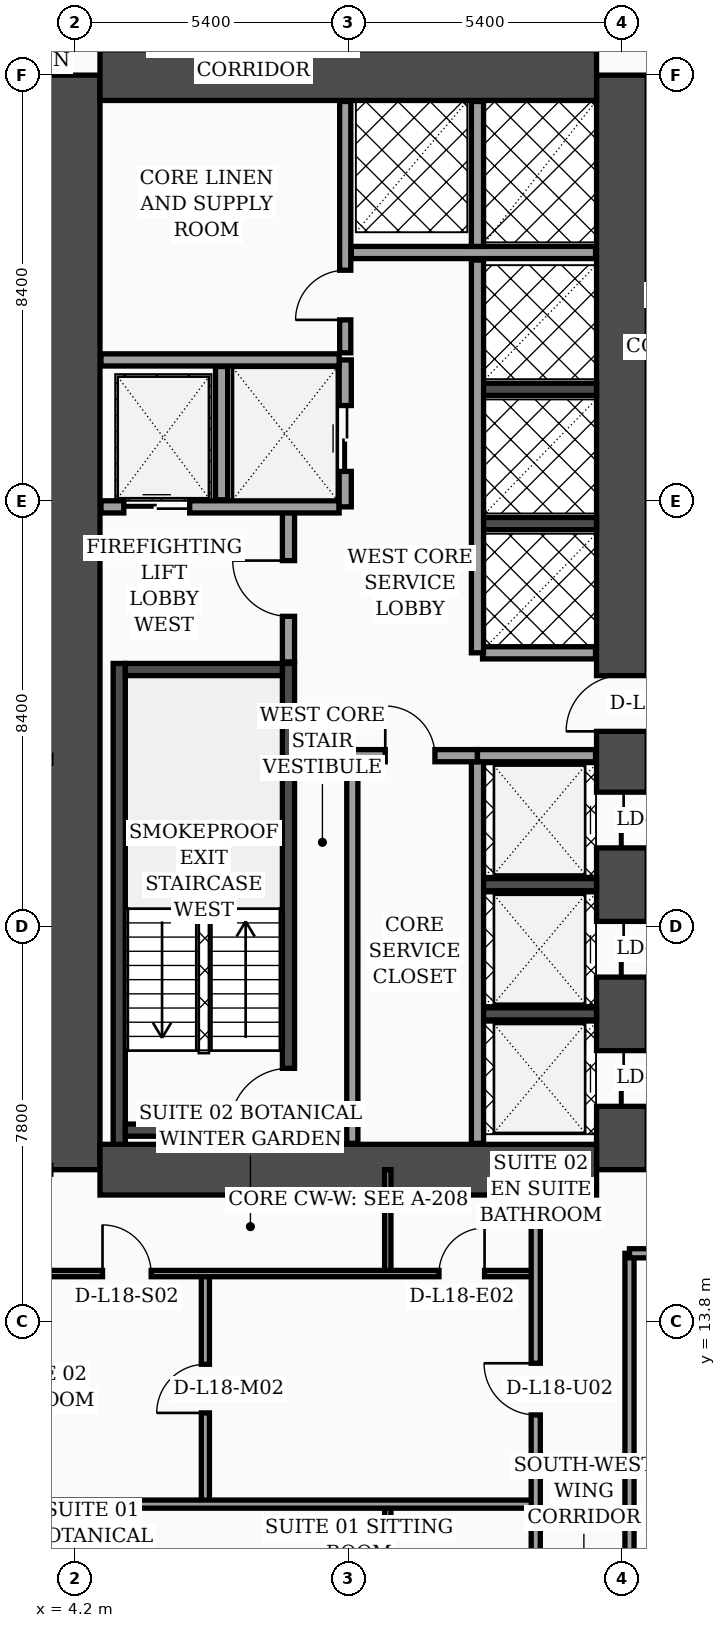
"""IFC4 building model, lengths in metres.
Left out: names, types, materials, properties, quantities, classifications, styles, units other than length and angle.
Written with IfcOpenShell. Run it as: python <this file> out.ifc"""

import sys

from ifc_helpers import new_model, si_unit, direction, frame, frame_2d, origin, place, context, subcontext, project, spatial, rectangle, extrude, element, fill, save


model = new_model("IFC4")
c1 = context("Model", 3, precision=1e-05, world=origin(), true_north=direction((0.0, 1.0)))
c2 = subcontext(c1, "Body", "Model", "MODEL_VIEW")
j1 = project(units=[si_unit("LENGTHUNIT", "METRE"), si_unit("PLANEANGLEUNIT", "RADIAN")], contexts=[c1])
p1 = place(None, origin())
s1 = spatial("IfcSite", under=j1, at=p1, CompositionType="ELEMENT")
p2 = place(p1, origin())
s2 = spatial("IfcBuilding", under=s1, at=p2, CompositionType="ELEMENT")
p3 = place(p2, frame((0.0, 0.0, 77.4)))
s3 = spatial("IfcBuildingStorey", under=s2, at=p3, CompositionType="ELEMENT", Elevation=77.4)
p4 = place(p3, frame((4.2, 16.8, 0.0), z_axis=(0.0, 0.0, 1.0), x_axis=(0.0, 1.0, 0.0)))
e1 = element("IfcWall", 1, at=p4, inside=s3, PredefinedType="SHEAR", context=c2, shape_type="SweptSolid", body=[
    extrude(rectangle(XDim=21.6, YDim=1.0, at=frame_2d((10.8, 0.0))), origin(), (0.0, 0.0, 1.0), 3.56),
])
p5 = place(p3, frame((15.0, 16.8, 0.0), z_axis=(0.0, 0.0, 1.0), x_axis=(0.0, 1.0, 0.0)))
e2 = element("IfcWall", 2, at=p5, inside=s3, PredefinedType="SHEAR", context=c2, shape_type="SweptSolid", body=[
    extrude(rectangle(XDim=21.6, YDim=1.0, at=frame_2d((10.8, 0.0))), origin(), (0.0, 0.0, 1.0), 3.56),
])
p6 = place(p5, frame((8.65, 0.0, 0.0)))
e3 = element("IfcOpeningElement", 3, at=p6, cuts=e2, PredefinedType="OPENING", context=c2, shape_type="SweptSolid", body=[
    extrude(rectangle(XDim=1.1, YDim=2.2, at=frame_2d((0.55, 1.1))), frame((0.0, 0.51, 0.0), z_axis=(0.0, -1.0, 0.0), x_axis=(1.0, 0.0, 0.0)), (0.0, 0.0, 1.0), 1.02),
])
p7 = place(p5, frame((1.25, 0.0, 0.0)))
e4 = element("IfcOpeningElement", 4, at=p7, cuts=e2, PredefinedType="OPENING", context=c2, shape_type="SweptSolid", body=[
    extrude(rectangle(XDim=1.1, YDim=2.2, at=frame_2d((0.55, 1.1))), frame((0.0, 0.51, 0.0), z_axis=(0.0, -1.0, 0.0), x_axis=(1.0, 0.0, 0.0)), (0.0, 0.0, 1.0), 1.02),
])
p8 = place(p5, frame((3.8, 0.0, 0.0)))
e5 = element("IfcOpeningElement", 5, at=p8, cuts=e2, PredefinedType="OPENING", context=c2, shape_type="SweptSolid", body=[
    extrude(rectangle(XDim=1.1, YDim=2.2, at=frame_2d((0.55, 1.1))), frame((0.0, 0.51, 0.0), z_axis=(0.0, -1.0, 0.0), x_axis=(1.0, 0.0, 0.0)), (0.0, 0.0, 1.0), 1.02),
])
p9 = place(p5, frame((6.35, 0.0, 0.0)))
e6 = element("IfcOpeningElement", 6, at=p9, cuts=e2, PredefinedType="OPENING", context=c2, shape_type="SweptSolid", body=[
    extrude(rectangle(XDim=1.1, YDim=2.2, at=frame_2d((0.55, 1.1))), frame((0.0, 0.51, 0.0), z_axis=(0.0, -1.0, 0.0), x_axis=(1.0, 0.0, 0.0)), (0.0, 0.0, 1.0), 1.02),
])
for number, where, z_axis, x_axis in (
    (7, (4.7, 38.4, 0.0), (0.0, 0.0, 1.0), (1.0, 0.0, 0.0)),
    (8, (4.7, 16.8, 0.0), (0.0, 0.0, 1.0), (1.0, 0.0, 0.0)),
):
    element("IfcWall", number, at=place(p3, frame(where, z_axis=z_axis, x_axis=x_axis)), inside=s3, PredefinedType="SHEAR", context=c2, shape_type="SweptSolid", body=[
        extrude(rectangle(XDim=9.8, YDim=1.0, at=frame_2d((4.9, 0.0))), origin(), (0.0, 0.0, 1.0), 3.56),
    ])
p10 = place(p3, frame((5.08, 17.3, 0.0), z_axis=(0.0, 0.0, 1.0), x_axis=(0.0, 1.0, 0.0)))
e9 = element("IfcWall", 9, at=p10, inside=s3, PredefinedType="SOLIDWALL", context=c2, shape_type="SweptSolid", body=[
    extrude(rectangle(XDim=9.49, YDim=0.24, at=frame_2d((4.745, 0.0))), origin(), (0.0, 0.0, 1.0), 3.56),
])
p11 = place(p3, frame((8.42, 17.3, 0.0), z_axis=(0.0, 0.0, 1.0), x_axis=(0.0, 1.0, 0.0)))
e10 = element("IfcWall", 10, at=p11, inside=s3, PredefinedType="SOLIDWALL", context=c2, shape_type="SweptSolid", body=[
    extrude(rectangle(XDim=9.49, YDim=0.24, at=frame_2d((4.745, 0.0))), origin(), (0.0, 0.0, 1.0), 3.56),
])
p12 = place(p11, frame((0.35, 0.0, 0.0)))
e11 = element("IfcOpeningElement", 11, at=p12, cuts=e10, PredefinedType="OPENING", context=c2, shape_type="SweptSolid", body=[
    extrude(rectangle(XDim=1.15, YDim=2.2, at=frame_2d((0.575, 1.1))), frame((0.0, 0.13, 0.0), z_axis=(0.0, -1.0, 0.0), x_axis=(1.0, 0.0, 0.0)), (0.0, 0.0, 1.0), 0.26),
])
for number, where, z_axis, x_axis in (
    (12, (5.2, 17.58, 0.0), (0.0, 0.0, 1.0), (1.0, 0.0, 0.0)),
    (13, (5.2, 26.67, 0.0), (0.0, 0.0, 1.0), (1.0, 0.0, 0.0)),
):
    element("IfcWall", number, at=place(p3, frame(where, z_axis=z_axis, x_axis=x_axis)), inside=s3, PredefinedType="SOLIDWALL", context=c2, shape_type="SweptSolid", body=[
        extrude(rectangle(XDim=3.1, YDim=0.24, at=frame_2d((1.55, 0.0))), origin(), (0.0, 0.0, 1.0), 3.56),
    ])
for number, where, z_axis, x_axis in (
    (14, (12.18, 19.875, 0.0), (0.0, 0.0, 1.0), (1.0, 0.0, 0.0)),
    (15, (12.18, 22.425, 0.0), (0.0, 0.0, 1.0), (1.0, 0.0, 0.0)),
    (16, (12.18, 29.55, 0.0), (0.0, 0.0, 1.0), (1.0, 0.0, 0.0)),
    (17, (12.18, 32.2, 0.0), (0.0, 0.0, 1.0), (1.0, 0.0, 0.0)),
):
    element("IfcWall", number, at=place(p3, frame(where, z_axis=z_axis, x_axis=x_axis)), inside=s3, PredefinedType="SOLIDWALL", context=c2, shape_type="SweptSolid", body=[
        extrude(rectangle(XDim=2.32, YDim=0.24, at=frame_2d((1.16, 0.0))), origin(), (0.0, 0.0, 1.0), 3.56),
    ])
p13 = place(p3, frame((8.42, 26.82, 0.0), z_axis=(0.0, 0.0, 1.0), x_axis=(0.0, 1.0, 0.0)))
e18 = element("IfcWall", 18, at=p13, inside=s3, PredefinedType="SOLIDWALL", context=c2, shape_type="SweptSolid", body=[
    extrude(rectangle(XDim=3.0, YDim=0.24, at=frame_2d((1.5, 0.0))), origin(), (0.0, 0.0, 1.0), 3.56),
])
p14 = place(p13, frame((0.9, 0.0, 0.0)))
e19 = element("IfcOpeningElement", 19, at=p14, cuts=e18, PredefinedType="OPENING", context=c2, shape_type="SweptSolid", body=[
    extrude(rectangle(XDim=1.1, YDim=2.2, at=frame_2d((0.55, 1.1))), frame((0.0, 0.13, 0.0), z_axis=(0.0, -1.0, 0.0), x_axis=(1.0, 0.0, 0.0)), (0.0, 0.0, 1.0), 0.26),
])
p15 = place(p3, frame((4.72, 29.88, 0.0), z_axis=(0.0, 0.0, 1.0), x_axis=(1.0, 0.0, 0.0)))
e20 = element("IfcWall", 20, at=p15, inside=s3, PredefinedType="SOLIDWALL", context=c2, shape_type="SweptSolid", body=[
    extrude(rectangle(XDim=4.7, YDim=0.24, at=frame_2d((2.35, 0.0))), origin(), (0.0, 0.0, 1.0), 3.56),
])
p16 = place(p15, frame((0.45, 0.0, 0.0)))
e21 = element("IfcOpeningElement", 21, at=p16, cuts=e20, PredefinedType="OPENING", context=c2, shape_type="SweptSolid", body=[
    extrude(rectangle(XDim=1.3, YDim=2.35, at=frame_2d((0.65, 1.175))), frame((0.0, 0.13, 0.0), z_axis=(0.0, -1.0, 0.0), x_axis=(1.0, 0.0, 0.0)), (0.0, 0.0, 1.0), 0.26),
])
p17 = place(p3, frame((7.1, 30.02, 0.0), z_axis=(0.0, 0.0, 1.0), x_axis=(0.0, 1.0, 0.0)))
e22 = element("IfcWall", 22, at=p17, inside=s3, PredefinedType="SOLIDWALL", context=c2, shape_type="SweptSolid", body=[
    extrude(rectangle(XDim=2.63, YDim=0.24, at=frame_2d((1.315, 0.0))), origin(), (0.0, 0.0, 1.0), 3.56),
])
p18 = place(p3, frame((9.54, 29.88, 0.0), z_axis=(0.0, 0.0, 1.0), x_axis=(0.0, 1.0, 0.0)))
e23 = element("IfcWall", 23, at=p18, inside=s3, PredefinedType="SOLIDWALL", context=c2, shape_type="SweptSolid", body=[
    extrude(rectangle(XDim=2.9, YDim=0.24, at=frame_2d((1.45, 0.0))), origin(), (0.0, 0.0, 1.0), 3.56),
])
p19 = place(p18, frame((0.7, 0.0, 0.0)))
e24 = element("IfcOpeningElement", 24, at=p19, cuts=e23, PredefinedType="OPENING", context=c2, shape_type="SweptSolid", body=[
    extrude(rectangle(XDim=1.3, YDim=2.35, at=frame_2d((0.65, 1.175))), frame((0.0, 0.13, 0.0), z_axis=(0.0, -1.0, 0.0), x_axis=(1.0, 0.0, 0.0)), (0.0, 0.0, 1.0), 0.26),
])
p20 = place(p3, frame((4.72, 32.78, 0.0), z_axis=(0.0, 0.0, 1.0), x_axis=(1.0, 0.0, 0.0)))
e25 = element("IfcWall", 25, at=p20, inside=s3, PredefinedType="SOLIDWALL", context=c2, shape_type="SweptSolid", body=[
    extrude(rectangle(XDim=4.7, YDim=0.24, at=frame_2d((2.35, 0.0))), origin(), (0.0, 0.0, 1.0), 3.56),
])
p21 = place(p3, frame((9.68, 17.32, 0.0), z_axis=(0.0, 0.0, 1.0), x_axis=(0.0, 1.0, 0.0)))
e26 = element("IfcWall", 26, at=p21, inside=s3, PredefinedType="SOLIDWALL", context=c2, shape_type="SweptSolid", body=[
    extrude(rectangle(XDim=7.68, YDim=0.22, at=frame_2d((3.84, 0.0))), origin(), (0.0, 0.0, 1.0), 3.56),
])
p22 = place(p3, frame((9.54, 32.92, 0.0), z_axis=(0.0, 0.0, 1.0), x_axis=(0.0, 1.0, 0.0)))
e27 = element("IfcWall", 27, at=p22, inside=s3, PredefinedType="SOLIDWALL", context=c2, shape_type="SweptSolid", body=[
    extrude(rectangle(XDim=4.96, YDim=0.22, at=frame_2d((2.48, 0.0))), origin(), (0.0, 0.0, 1.0), 3.56),
])
p23 = place(p22, frame((0.65, 0.0, 0.0)))
e28 = element("IfcOpeningElement", 28, at=p23, cuts=e27, PredefinedType="OPENING", context=c2, shape_type="SweptSolid", body=[
    extrude(rectangle(XDim=0.98, YDim=2.15, at=frame_2d((0.49, 1.075))), frame((0.0, 0.12, 0.0), z_axis=(0.0, -1.0, 0.0), x_axis=(1.0, 0.0, 0.0)), (0.0, 0.0, 1.0), 0.24),
])
p24 = place(p3, frame((12.15, 17.32, 0.0), z_axis=(0.0, 0.0, 1.0), x_axis=(0.0, 1.0, 0.0)))
e29 = element("IfcWall", 29, at=p24, inside=s3, PredefinedType="SOLIDWALL", context=c2, shape_type="SweptSolid", body=[
    extrude(rectangle(XDim=7.65, YDim=0.24, at=frame_2d((3.825, 0.0))), origin(), (0.0, 0.0, 1.0), 3.56),
])
p25 = place(p3, frame((9.68, 24.97, 0.0), z_axis=(0.0, 0.0, 1.0), x_axis=(1.0, 0.0, 0.0)))
e30 = element("IfcWall", 30, at=p25, inside=s3, PredefinedType="SOLIDWALL", context=c2, shape_type="SweptSolid", body=[
    extrude(rectangle(XDim=2.47, YDim=0.24, at=frame_2d((1.235, 0.0))), origin(), (0.0, 0.0, 1.0), 3.56),
])
p26 = place(p25, frame((0.65, 0.0, 0.0)))
e31 = element("IfcOpeningElement", 31, at=p26, cuts=e30, PredefinedType="OPENING", context=c2, shape_type="SweptSolid", body=[
    extrude(rectangle(XDim=0.98, YDim=2.15, at=frame_2d((0.49, 1.075))), frame((0.0, 0.13, 0.0), z_axis=(0.0, -1.0, 0.0), x_axis=(1.0, 0.0, 0.0)), (0.0, 0.0, 1.0), 0.26),
])
p27 = place(p3, frame((12.15, 24.97, 0.0), z_axis=(0.0, 0.0, 1.0), x_axis=(1.0, 0.0, 0.0)))
e32 = element("IfcWall", 32, at=p27, inside=s3, PredefinedType="SOLIDWALL", context=c2, shape_type="SweptSolid", body=[
    extrude(rectangle(XDim=2.33, YDim=0.24, at=frame_2d((1.165, 0.0))), origin(), (0.0, 0.0, 1.0), 2.84),
])
p28 = place(p3, frame((12.25, 27.0, 0.0), z_axis=(0.0, 0.0, 1.0), x_axis=(1.0, 0.0, 0.0)))
e33 = element("IfcWall", 33, at=p28, inside=s3, PredefinedType="SOLIDWALL", context=c2, shape_type="SweptSolid", body=[
    extrude(rectangle(XDim=2.23, YDim=0.24, at=frame_2d((1.115, 0.0))), origin(), (0.0, 0.0, 1.0), 3.56),
])
p29 = place(p3, frame((12.15, 27.0, 0.0), z_axis=(0.0, 0.0, 1.0), x_axis=(0.0, 1.0, 0.0)))
e34 = element("IfcWall", 34, at=p29, inside=s3, PredefinedType="SOLIDWALL", context=c2, shape_type="SweptSolid", body=[
    extrude(rectangle(XDim=7.75, YDim=0.24, at=frame_2d((3.875, 0.0))), origin(), (0.0, 0.0, 1.0), 3.56),
])
p30 = place(p3, frame((9.66, 34.9, 0.0), z_axis=(0.0, 0.0, 1.0), x_axis=(1.0, 0.0, 0.0)))
e35 = element("IfcWall", 35, at=p30, inside=s3, PredefinedType="SOLIDWALL", context=c2, shape_type="SweptSolid", body=[
    extrude(rectangle(XDim=4.82, YDim=0.24, at=frame_2d((2.41, 0.0))), origin(), (0.0, 0.0, 1.0), 3.56),
])
p31 = place(p3, frame((12.15, 35.02, 0.0), z_axis=(0.0, 0.0, 1.0), x_axis=(0.0, 1.0, 0.0)))
e36 = element("IfcWall", 36, at=p31, inside=s3, PredefinedType="SOLIDWALL", context=c2, shape_type="SweptSolid", body=[
    extrude(rectangle(XDim=2.86, YDim=0.24, at=frame_2d((1.43, 0.0))), origin(), (0.0, 0.0, 1.0), 3.56),
])
p32 = place(p3, frame((10.38, 8.22, 0.0), z_axis=(0.0, 0.0, 1.0), x_axis=(0.0, 1.0, 0.0)))
e37 = element("IfcWall", 37, at=p32, inside=s3, PredefinedType="PARTITIONING", context=c2, shape_type="SweptSolid", body=[
    extrude(rectangle(XDim=1.98, YDim=0.125, at=frame_2d((0.99, 0.0))), origin(), (0.0, 0.0, 1.0), 3.09),
])
p33 = place(p3, frame((10.38, 14.75, 0.0), z_axis=(0.0, 0.0, 1.0), x_axis=(0.0, 1.0, 0.0)))
e38 = element("IfcWall", 38, at=p33, inside=s3, PredefinedType="PARTITIONING", context=c2, shape_type="SweptSolid", body=[
    extrude(rectangle(XDim=2.05, YDim=0.125, at=frame_2d((1.025, 0.0))), origin(), (0.0, 0.0, 1.0), 3.56),
])
p34 = place(p3, frame((6.78, 10.2, 0.0), z_axis=(0.0, 0.0, 1.0), x_axis=(0.0, 1.0, 0.0)))
e39 = element("IfcWall", 39, at=p34, inside=s3, PredefinedType="PARTITIONING", context=c2, shape_type="SweptSolid", body=[
    extrude(rectangle(XDim=4.55, YDim=0.16, at=frame_2d((2.275, 0.0))), origin(), (0.0, 0.0, 1.0), 3.14),
])
p35 = place(p34, frame((1.8, 0.0, 0.0)))
e40 = element("IfcOpeningElement", 40, at=p35, cuts=e39, PredefinedType="OPENING", context=c2, shape_type="SweptSolid", body=[
    extrude(rectangle(XDim=0.96, YDim=2.2, at=frame_2d((0.48, 1.1))), frame((0.0, 0.09, 0.0), z_axis=(0.0, -1.0, 0.0), x_axis=(1.0, 0.0, 0.0)), (0.0, 0.0, 1.0), 0.18),
])
p36 = place(p3, frame((0.08, 14.75, 0.0), z_axis=(0.0, 0.0, 1.0), x_axis=(1.0, 0.0, 0.0)))
e41 = element("IfcWall", 41, at=p36, inside=s3, PredefinedType="PARTITIONING", context=c2, shape_type="SweptSolid", body=[
    extrude(rectangle(XDim=13.22, YDim=0.125, at=frame_2d((6.61, 0.0))), origin(), (0.0, 0.0, 1.0), 2.84),
])
p37 = place(p36, frame((4.67, 0.0, 0.0)))
e42 = element("IfcOpeningElement", 42, at=p37, cuts=e41, PredefinedType="OPENING", context=c2, shape_type="SweptSolid", body=[
    extrude(rectangle(XDim=0.96, YDim=2.2, at=frame_2d((0.48, 1.1))), frame((0.0, 0.073, 0.0), z_axis=(0.0, -1.0, 0.0), x_axis=(1.0, 0.0, 0.0)), (0.0, 0.0, 1.0), 0.145),
])
p38 = place(p36, frame((11.31, 0.0, 0.0)))
e43 = element("IfcOpeningElement", 43, at=p38, cuts=e41, PredefinedType="OPENING", context=c2, shape_type="SweptSolid", body=[
    extrude(rectangle(XDim=0.9, YDim=2.15, at=frame_2d((0.45, 1.075))), frame((0.0, 0.073, 0.0), z_axis=(0.0, -1.0, 0.0), x_axis=(1.0, 0.0, 0.0)), (0.0, 0.0, 1.0), 0.145),
])
p39 = place(p3, frame((0.08, 10.2, 0.0), z_axis=(0.0, 0.0, 1.0), x_axis=(1.0, 0.0, 0.0)))
e44 = element("IfcWall", 44, at=p39, inside=s3, PredefinedType="PARTITIONING", context=c2, shape_type="SweptSolid", body=[
    extrude(rectangle(XDim=13.22, YDim=0.16, at=frame_2d((6.61, 0.0))), origin(), (0.0, 0.0, 1.0), 2.84),
])
p40 = place(p3, frame((13.3, 2.44, 0.0), z_axis=(0.0, 0.0, 1.0), x_axis=(0.0, 1.0, 0.0)))
e45 = element("IfcWall", 45, at=p40, inside=s3, PredefinedType="PARTITIONING", context=c2, shape_type="SweptSolid", body=[
    extrude(rectangle(XDim=14.36, YDim=0.18, at=frame_2d((7.18, 0.0))), origin(), (0.0, 0.0, 1.0), 3.04),
])
p41 = place(p40, frame((3.01, 0.0, 0.0)))
e46 = element("IfcOpeningElement", 46, at=p41, cuts=e45, PredefinedType="OPENING", context=c2, shape_type="SweptSolid", body=[
    extrude(rectangle(XDim=1.02, YDim=2.2, at=frame_2d((0.51, 1.1))), frame((0.0, 0.1, 0.0), z_axis=(0.0, -1.0, 0.0), x_axis=(1.0, 0.0, 0.0)), (0.0, 0.0, 1.0), 0.2),
])
p42 = place(p40, frame((9.52, 0.0, 0.0)))
e47 = element("IfcOpeningElement", 47, at=p42, cuts=e45, PredefinedType="OPENING", context=c2, shape_type="SweptSolid", body=[
    extrude(rectangle(XDim=1.02, YDim=2.2, at=frame_2d((0.51, 1.1))), frame((0.0, 0.1, 0.0), z_axis=(0.0, -1.0, 0.0), x_axis=(1.0, 0.0, 0.0)), (0.0, 0.0, 1.0), 0.2),
])
p43 = place(p3, frame((15.15, 2.44, 0.0), z_axis=(0.0, 0.0, 1.0), x_axis=(0.0, 1.0, 0.0)))
e48 = element("IfcWall", 48, at=p43, inside=s3, PredefinedType="PARTITIONING", context=c2, shape_type="SweptSolid", body=[
    extrude(rectangle(XDim=12.71, YDim=0.18, at=frame_2d((6.355, 0.0))), origin(), (0.0, 0.0, 1.0), 3.04),
])
p44 = place(p3, frame((15.15, 15.15, 0.0), z_axis=(0.0, 0.0, 1.0), x_axis=(1.0, 0.0, 0.0)))
e49 = element("IfcWall", 49, at=p44, inside=s3, PredefinedType="PARTITIONING", context=c2, shape_type="SweptSolid", body=[
    extrude(rectangle(XDim=6.45, YDim=0.18, at=frame_2d((3.225, 0.0))), origin(), (0.0, 0.0, 1.0), 2.34),
])
p45 = place(p44, frame((1.74, 0.0, 0.0)))
e50 = element("IfcOpeningElement", 50, at=p45, cuts=e49, PredefinedType="OPENING", context=c2, shape_type="SweptSolid", body=[
    extrude(rectangle(XDim=1.02, YDim=2.2, at=frame_2d((0.51, 1.1))), frame((0.0, 0.1, 0.0), z_axis=(0.0, -1.0, 0.0), x_axis=(1.0, 0.0, 0.0)), (0.0, 0.0, 1.0), 0.2),
])
p46 = place(p14, origin())
e51 = element("IfcDoor", 51, at=p46, inside=s3, OperationType="SINGLE_SWING_RIGHT", PredefinedType="DOOR", context=c2, shape_type="SweptSolid", body=[
    extrude(rectangle(XDim=1.1, YDim=2.2, at=frame_2d((0.55, 1.1))), frame((0.0, 0.025, 0.0), z_axis=(0.0, -1.0, 0.0), x_axis=(1.0, 0.0, 0.0)), (0.0, 0.0, 1.0), 0.05),
])
fill(e19, e51)
p47 = place(p16, origin())
e52 = element("IfcDoor", 52, at=p47, inside=s3, OperationType="DOUBLE_DOOR_SLIDING", PredefinedType="DOOR", context=c2, shape_type="SweptSolid", body=[
    extrude(rectangle(XDim=1.3, YDim=2.35, at=frame_2d((0.65, 1.175))), frame((0.0, 0.025, 0.0), z_axis=(0.0, -1.0, 0.0), x_axis=(1.0, 0.0, 0.0)), (0.0, 0.0, 1.0), 0.05),
])
fill(e21, e52)
p48 = place(p19, origin())
e53 = element("IfcDoor", 53, at=p48, inside=s3, OperationType="DOUBLE_DOOR_SLIDING", PredefinedType="DOOR", context=c2, shape_type="SweptSolid", body=[
    extrude(rectangle(XDim=1.3, YDim=2.35, at=frame_2d((0.65, 1.175))), frame((0.0, 0.025, 0.0), z_axis=(0.0, -1.0, 0.0), x_axis=(1.0, 0.0, 0.0)), (0.0, 0.0, 1.0), 0.05),
])
fill(e24, e53)
p49 = place(p23, origin())
e54 = element("IfcDoor", 54, at=p49, inside=s3, OperationType="SINGLE_SWING_LEFT", PredefinedType="DOOR", context=c2, shape_type="SweptSolid", body=[
    extrude(rectangle(XDim=0.98, YDim=2.15, at=frame_2d((0.49, 1.075))), frame((0.0, 0.025, 0.0), z_axis=(0.0, -1.0, 0.0), x_axis=(1.0, 0.0, 0.0)), (0.0, 0.0, 1.0), 0.05),
])
fill(e28, e54)
p50 = place(p26, origin())
e55 = element("IfcDoor", 55, at=p50, inside=s3, OperationType="SINGLE_SWING_LEFT", PredefinedType="DOOR", context=c2, shape_type="SweptSolid", body=[
    extrude(rectangle(XDim=0.98, YDim=2.15, at=frame_2d((0.49, 1.075))), frame((0.0, 0.025, 0.0), z_axis=(0.0, -1.0, 0.0), x_axis=(1.0, 0.0, 0.0)), (0.0, 0.0, 1.0), 0.05),
])
fill(e31, e55)
p51 = place(p35, origin())
e56 = element("IfcDoor", 56, at=p51, inside=s3, OperationType="SINGLE_SWING_LEFT", PredefinedType="DOOR", context=c2, shape_type="SweptSolid", body=[
    extrude(rectangle(XDim=0.96, YDim=2.2, at=frame_2d((0.48, 1.1))), frame((0.0, 0.025, 0.0), z_axis=(0.0, -1.0, 0.0), x_axis=(1.0, 0.0, 0.0)), (0.0, 0.0, 1.0), 0.05),
])
fill(e40, e56)
p52 = place(p37, origin())
e57 = element("IfcDoor", 57, at=p52, inside=s3, OperationType="SINGLE_SWING_LEFT", PredefinedType="DOOR", context=c2, shape_type="SweptSolid", body=[
    extrude(rectangle(XDim=0.96, YDim=2.2, at=frame_2d((0.48, 1.1))), frame((0.0, 0.025, 0.0), z_axis=(0.0, -1.0, 0.0), x_axis=(1.0, 0.0, 0.0)), (0.0, 0.0, 1.0), 0.05),
])
fill(e42, e57)
p53 = place(p38, origin())
e58 = element("IfcDoor", 58, at=p53, inside=s3, OperationType="SINGLE_SWING_RIGHT", PredefinedType="DOOR", context=c2, shape_type="SweptSolid", body=[
    extrude(rectangle(XDim=0.9, YDim=2.15, at=frame_2d((0.45, 1.075))), frame((0.0, 0.025, 0.0), z_axis=(0.0, -1.0, 0.0), x_axis=(1.0, 0.0, 0.0)), (0.0, 0.0, 1.0), 0.05),
])
fill(e43, e58)
p54 = place(p42, origin())
e59 = element("IfcDoor", 59, at=p54, inside=s3, OperationType="SINGLE_SWING_RIGHT", PredefinedType="DOOR", context=c2, shape_type="SweptSolid", body=[
    extrude(rectangle(XDim=1.02, YDim=2.2, at=frame_2d((0.51, 1.1))), frame((0.0, 0.025, 0.0), z_axis=(0.0, -1.0, 0.0), x_axis=(1.0, 0.0, 0.0)), (0.0, 0.0, 1.0), 0.05),
])
fill(e47, e59)
p55 = place(p12, origin())
e60 = element("IfcDoor", 60, at=p55, inside=s3, OperationType="SINGLE_SWING_LEFT", PredefinedType="DOOR", context=c2, shape_type="SweptSolid", body=[
    extrude(rectangle(XDim=1.15, YDim=2.2, at=frame_2d((0.575, 1.1))), frame((0.0, 0.025, 0.0), z_axis=(0.0, -1.0, 0.0), x_axis=(1.0, 0.0, 0.0)), (0.0, 0.0, 1.0), 0.05),
])
fill(e11, e60)
p56 = place(p6, origin())
e61 = element("IfcDoor", 61, at=p56, inside=s3, OperationType="SINGLE_SWING_LEFT", PredefinedType="DOOR", context=c2, shape_type="SweptSolid", body=[
    extrude(rectangle(XDim=1.1, YDim=2.2, at=frame_2d((0.55, 1.1))), frame((0.0, 0.025, 0.0), z_axis=(0.0, -1.0, 0.0), x_axis=(1.0, 0.0, 0.0)), (0.0, 0.0, 1.0), 0.05),
])
fill(e3, e61)
p57 = place(p7, origin())
e62 = element("IfcDoor", 62, at=p57, inside=s3, OperationType="DOUBLE_DOOR_SLIDING", PredefinedType="DOOR", context=c2, shape_type="SweptSolid", body=[
    extrude(rectangle(XDim=1.1, YDim=2.2, at=frame_2d((0.55, 1.1))), frame((0.0, 0.025, 0.0), z_axis=(0.0, -1.0, 0.0), x_axis=(1.0, 0.0, 0.0)), (0.0, 0.0, 1.0), 0.05),
])
fill(e4, e62)
p58 = place(p8, origin())
e63 = element("IfcDoor", 63, at=p58, inside=s3, OperationType="DOUBLE_DOOR_SLIDING", PredefinedType="DOOR", context=c2, shape_type="SweptSolid", body=[
    extrude(rectangle(XDim=1.1, YDim=2.2, at=frame_2d((0.55, 1.1))), frame((0.0, 0.025, 0.0), z_axis=(0.0, -1.0, 0.0), x_axis=(1.0, 0.0, 0.0)), (0.0, 0.0, 1.0), 0.05),
])
fill(e5, e63)
p59 = place(p9, origin())
e64 = element("IfcDoor", 64, at=p59, inside=s3, OperationType="DOUBLE_DOOR_SLIDING", PredefinedType="DOOR", context=c2, shape_type="SweptSolid", body=[
    extrude(rectangle(XDim=1.1, YDim=2.2, at=frame_2d((0.55, 1.1))), frame((0.0, 0.025, 0.0), z_axis=(0.0, -1.0, 0.0), x_axis=(1.0, 0.0, 0.0)), (0.0, 0.0, 1.0), 0.05),
])
fill(e6, e64)
save(model, sys.argv[1])
